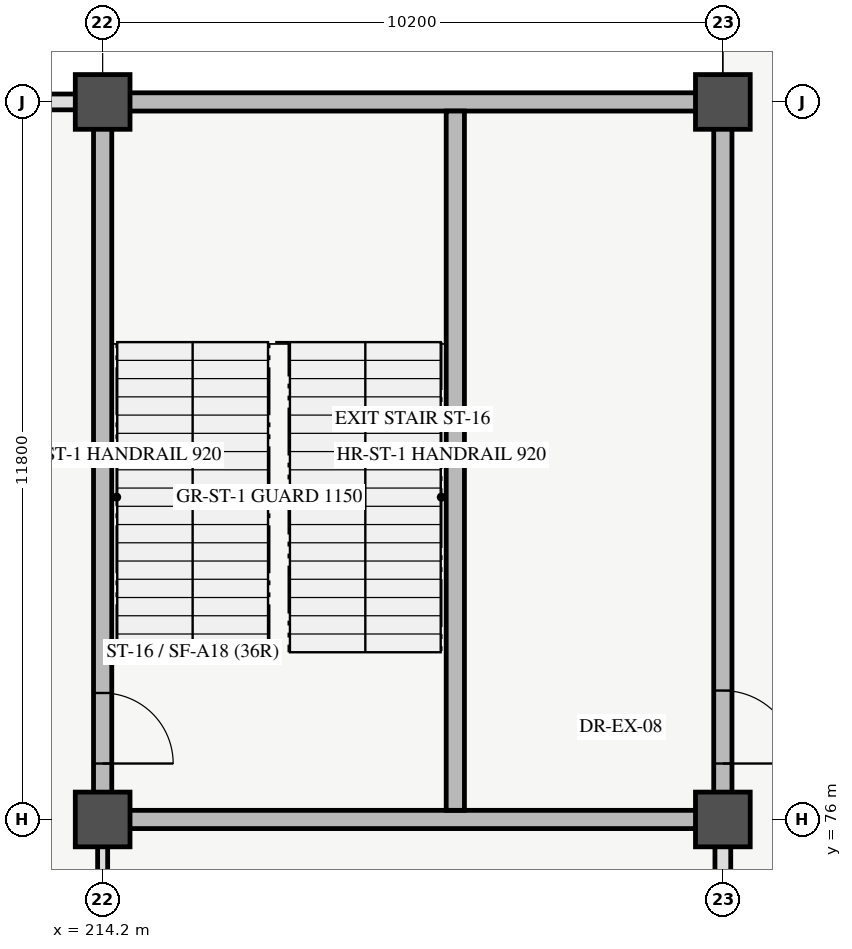
"""IFC4 building model, lengths in metres.
Left out: names, types, materials, properties, quantities, classifications, styles, units other than length and angle.
Written with IfcOpenShell. Run it as: python <this file> out.ifc"""

import sys

from ifc_helpers import new_model, si_unit, direction, frame, frame_2d, origin, origin_2d, place, context, subcontext, project, spatial, rectangle, extrude, element, fill, save


model = new_model("IFC4")
c1 = context("Model", 3, precision=1e-05, world=origin(), true_north=direction((0.0, 1.0)))
c2 = subcontext(c1, "Body", "Model", "MODEL_VIEW")
j1 = project(units=[si_unit("LENGTHUNIT", "METRE"), si_unit("PLANEANGLEUNIT", "RADIAN")], contexts=[c1])
p1 = place(None, origin())
s1 = spatial("IfcSite", under=j1, at=p1, CompositionType="ELEMENT")
p2 = place(p1, origin())
s2 = spatial("IfcBuilding", under=s1, at=p2, CompositionType="ELEMENT")
p3 = place(p2, origin())
s3 = spatial("IfcBuildingStorey", under=s2, at=p3, CompositionType="ELEMENT", Elevation=0.0)
for number, where, z_axis, x_axis in (
    (1, (214.2, 76.0, 0.0), (0.0, 0.0, 1.0), (1.0, 0.0, 0.0)),
    (2, (214.2, 87.8, 0.0), (0.0, 0.0, 1.0), (1.0, 0.0, 0.0)),
    (3, (224.4, 76.0, 0.0), (0.0, 0.0, 1.0), (1.0, 0.0, 0.0)),
    (4, (224.4, 87.8, 0.0), (0.0, 0.0, 1.0), (1.0, 0.0, 0.0)),
):
    element("IfcColumn", number, at=place(p3, frame(where, z_axis=z_axis, x_axis=x_axis)), inside=s3, PredefinedType="COLUMN", context=c2, shape_type="SweptSolid", body=[
        extrude(rectangle(XDim=0.9, YDim=0.9, at=origin_2d()), origin(), (0.0, 0.0, 1.0), 5.4),
    ])
p4 = place(p3, frame((224.4, 64.44, 0.0), z_axis=(0.0, 0.0, 1.0), x_axis=(0.0, 1.0, 0.0)))
e5 = element("IfcWall", 5, at=p4, inside=s3, PredefinedType="STANDARD", context=c2, shape_type="SweptSolid", body=[
    extrude(rectangle(XDim=11.32, YDim=0.26, at=frame_2d((5.66, 0.0))), origin(), (0.0, 0.0, 1.0), 3.68),
])
p5 = place(p4, frame((2.562, 0.0, 0.0)))
e6 = element("IfcOpeningElement", 6, at=p5, cuts=e5, PredefinedType="OPENING", context=c2, shape_type="SweptSolid", body=[
    extrude(rectangle(XDim=2.8, YDim=2.45, at=frame_2d((1.4, 1.225))), frame((0.0, 0.14, 0.0), z_axis=(0.0, -1.0, 0.0), x_axis=(1.0, 0.0, 0.0)), (0.0, 0.0, 1.0), 0.28),
])
p6 = place(p4, frame((6.877, 0.0, 0.9)))
e7 = element("IfcOpeningElement", 7, at=p6, cuts=e5, PredefinedType="OPENING", context=c2, shape_type="SweptSolid", body=[
    extrude(rectangle(XDim=3.0, YDim=2.1, at=frame_2d((1.5, 1.05))), frame((0.0, 0.14, 0.0), z_axis=(0.0, -1.0, 0.0), x_axis=(1.0, 0.0, 0.0)), (0.0, 0.0, 1.0), 0.28),
])
p7 = place(p3, frame((204.24, 87.8, 0.0), z_axis=(0.0, 0.0, 1.0), x_axis=(1.0, 0.0, 0.0)))
e8 = element("IfcWall", 8, at=p7, inside=s3, PredefinedType="STANDARD", context=c2, shape_type="SweptSolid", body=[
    extrude(rectangle(XDim=9.72, YDim=0.26, at=frame_2d((4.86, 0.0))), origin(), (0.0, 0.0, 1.0), 3.68),
])
p8 = place(p7, frame((3.56, 0.0, 0.0)))
e9 = element("IfcOpeningElement", 9, at=p8, cuts=e8, PredefinedType="OPENING", context=c2, shape_type="SweptSolid", body=[
    extrude(rectangle(XDim=2.6, YDim=2.4, at=frame_2d((1.3, 1.2))), frame((0.0, 0.14, 0.0), z_axis=(0.0, -1.0, 0.0), x_axis=(1.0, 0.0, 0.0)), (0.0, 0.0, 1.0), 0.28),
])
for number, where, z_axis, x_axis in (
    (10, (214.2, 76.0, 0.0), (0.0, 0.0, 1.0), (1.0, 0.0, 0.0)),
    (11, (214.2, 87.8, 0.0), (0.0, 0.0, 1.0), (1.0, 0.0, 0.0)),
):
    element("IfcWall", number, at=place(p3, frame(where, z_axis=z_axis, x_axis=x_axis)), inside=s3, PredefinedType="SHEAR", context=c2, shape_type="SweptSolid", body=[
        extrude(rectangle(XDim=10.2, YDim=0.3, at=frame_2d((5.1, 0.0))), origin(), (0.0, 0.0, 1.0), 5.4),
    ])
p9 = place(p3, frame((214.2, 76.0, 0.0), z_axis=(0.0, 0.0, 1.0), x_axis=(0.0, 1.0, 0.0)))
e12 = element("IfcWall", 12, at=p9, inside=s3, PredefinedType="SHEAR", context=c2, shape_type="SweptSolid", body=[
    extrude(rectangle(XDim=11.8, YDim=0.3, at=frame_2d((5.9, 0.0))), origin(), (0.0, 0.0, 1.0), 5.4),
])
p10 = place(p9, frame((0.92, 0.0, 0.0)))
e13 = element("IfcOpeningElement", 13, at=p10, cuts=e12, PredefinedType="OPENING", context=c2, shape_type="SweptSolid", body=[
    extrude(rectangle(XDim=1.16, YDim=2.2, at=frame_2d((0.58, 1.1))), frame((0.0, 0.16, 0.0), z_axis=(0.0, -1.0, 0.0), x_axis=(1.0, 0.0, 0.0)), (0.0, 0.0, 1.0), 0.32),
])
p11 = place(p3, frame((224.4, 76.0, 0.0), z_axis=(0.0, 0.0, 1.0), x_axis=(0.0, 1.0, 0.0)))
e14 = element("IfcWall", 14, at=p11, inside=s3, PredefinedType="SHEAR", context=c2, shape_type="SweptSolid", body=[
    extrude(rectangle(XDim=11.8, YDim=0.3, at=frame_2d((5.9, 0.0))), origin(), (0.0, 0.0, 1.0), 5.4),
])
p12 = place(p11, frame((0.92, 0.0, 0.0)))
e15 = element("IfcOpeningElement", 15, at=p12, cuts=e14, PredefinedType="OPENING", context=c2, shape_type="SweptSolid", body=[
    extrude(rectangle(XDim=1.2, YDim=2.2, at=frame_2d((0.6, 1.1))), frame((0.0, 0.16, 0.0), z_axis=(0.0, -1.0, 0.0), x_axis=(1.0, 0.0, 0.0)), (0.0, 0.0, 1.0), 0.32),
])
p13 = place(p3, frame((220.0, 76.15, 0.0), z_axis=(0.0, 0.0, 1.0), x_axis=(0.0, 1.0, 0.0)))
e16 = element("IfcWall", 16, at=p13, inside=s3, PredefinedType="SHEAR", context=c2, shape_type="SweptSolid", body=[
    extrude(rectangle(XDim=11.5, YDim=0.3, at=frame_2d((5.75, 0.0))), origin(), (0.0, 0.0, 1.0), 5.4),
])
p14 = place(p3, frame((214.2, 64.6, 0.0), z_axis=(0.0, 0.0, 1.0), x_axis=(0.0, 1.0, 0.0)))
e17 = element("IfcWall", 17, at=p14, inside=s3, PredefinedType="PARTITIONING", context=c2, shape_type="SweptSolid", body=[
    extrude(rectangle(XDim=11.0, YDim=0.165, at=frame_2d((5.5, 0.0))), origin(), (0.0, 0.0, 1.0), 4.08),
])
p15 = place(p14, frame((5.03, 0.0, 0.0)))
e18 = element("IfcOpeningElement", 18, at=p15, cuts=e17, PredefinedType="OPENING", context=c2, shape_type="SweptSolid", body=[
    extrude(rectangle(XDim=0.94, YDim=2.08, at=frame_2d((0.47, 1.04))), frame((0.0, 0.093, 0.0), z_axis=(0.0, -1.0, 0.0), x_axis=(1.0, 0.0, 0.0)), (0.0, 0.0, 1.0), 0.185),
])
p16 = place(p10, origin())
e19 = element("IfcDoor", 19, at=p16, inside=s3, OperationType="SINGLE_SWING_LEFT", PredefinedType="DOOR", context=c2, shape_type="SweptSolid", body=[
    extrude(rectangle(XDim=1.16, YDim=2.2, at=frame_2d((0.58, 1.1))), frame((0.0, 0.025, 0.0), z_axis=(0.0, -1.0, 0.0), x_axis=(1.0, 0.0, 0.0)), (0.0, 0.0, 1.0), 0.05),
])
fill(e13, e19)
p17 = place(p12, frame((1.2, 0.0, 0.0), z_axis=(0.0, 0.0, 1.0), x_axis=(-1.0, 0.0, 0.0)))
e20 = element("IfcDoor", 20, at=p17, inside=s3, OperationType="SINGLE_SWING_LEFT", PredefinedType="DOOR", context=c2, shape_type="SweptSolid", body=[
    extrude(rectangle(XDim=1.2, YDim=2.2, at=frame_2d((0.6, 1.1))), frame((0.0, 0.025, 0.0), z_axis=(0.0, -1.0, 0.0), x_axis=(1.0, 0.0, 0.0)), (0.0, 0.0, 1.0), 0.05),
])
fill(e15, e20)
save(model, sys.argv[1])
